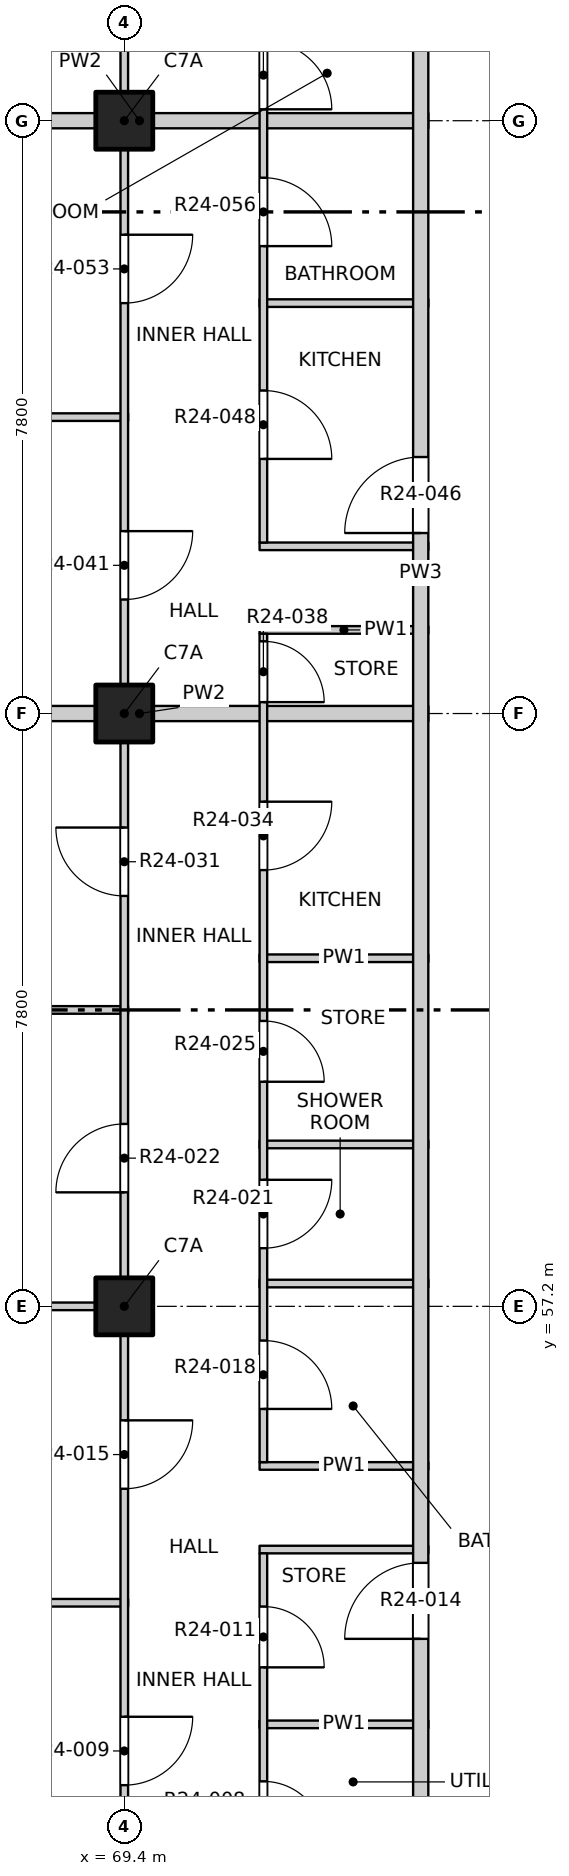
"""IFC4 building model, lengths in metres.
Left out: names, types, materials, properties, quantities, classifications, styles, units other than length and angle.
Written with IfcOpenShell. Run it as: python <this file> out.ifc"""

import sys

from ifc_helpers import new_model, si_unit, direction, frame, frame_2d, origin, origin_2d, place, context, subcontext, project, spatial, rectangle, extrude, element, fill, save


model = new_model("IFC4")
c1 = context("Model", 3, precision=1e-05, world=origin(), true_north=direction((0.0, 1.0)))
c2 = subcontext(c1, "Body", "Model", "MODEL_VIEW")
j1 = project(units=[si_unit("LENGTHUNIT", "METRE"), si_unit("PLANEANGLEUNIT", "RADIAN")], contexts=[c1])
p1 = place(None, origin())
s1 = spatial("IfcSite", under=j1, at=p1, CompositionType="ELEMENT")
p2 = place(p1, origin())
s2 = spatial("IfcBuilding", under=s1, at=p2, CompositionType="ELEMENT")
p3 = place(p2, frame((0.0, 0.0, 246.0)))
s3 = spatial("IfcBuildingStorey", under=s2, at=p3, CompositionType="ELEMENT", Elevation=246.0)
for number, where, z_axis, x_axis in (
    (1, (69.4, 57.2, -0.3), (0.0, 0.0, 1.0), (1.0, 0.0, 0.0)),
    (2, (69.4, 65.0, -0.3), (0.0, 0.0, 1.0), (1.0, 0.0, 0.0)),
    (3, (69.4, 72.8, -0.3), (0.0, 0.0, 1.0), (1.0, 0.0, 0.0)),
):
    element("IfcColumn", number, at=place(p3, frame(where, z_axis=z_axis, x_axis=x_axis)), inside=s3, PredefinedType="COLUMN", context=c2, shape_type="SweptSolid", body=[
        extrude(rectangle(XDim=0.75, YDim=0.75, at=origin_2d()), origin(), (0.0, 0.0, 1.0), 3.45),
    ])
p4 = place(p3, frame((71.18, 51.7, 0.0), z_axis=(0.0, 0.0, 1.0), x_axis=(1.0, 0.0, 0.0)))
e4 = element("IfcWall", 4, at=p4, inside=s3, PredefinedType="PARTITIONING", context=c2, shape_type="SweptSolid", body=[
    extrude(rectangle(XDim=2.22, YDim=0.1, at=frame_2d((1.11, 0.0))), origin(), (0.0, 0.0, 1.0), 3.15),
])
p5 = place(p3, frame((65.8, 53.3, 0.0), z_axis=(0.0, 0.0, 1.0), x_axis=(1.0, 0.0, 0.0)))
e5 = element("IfcWall", 5, at=p5, inside=s3, PredefinedType="PARTITIONING", context=c2, shape_type="SweptSolid", body=[
    extrude(rectangle(XDim=3.65, YDim=0.1, at=frame_2d((1.825, 0.0))), origin(), (0.0, 0.0, 1.0), 3.15),
])
for number, where, z_axis, x_axis in (
    (6, (71.18, 54.0, 0.0), (0.0, 0.0, 1.0), (1.0, 0.0, 0.0)),
    (7, (71.18, 55.1, 0.0), (0.0, 0.0, 1.0), (1.0, 0.0, 0.0)),
):
    element("IfcWall", number, at=place(p3, frame(where, z_axis=z_axis, x_axis=x_axis)), inside=s3, PredefinedType="PARTITIONING", context=c2, shape_type="SweptSolid", body=[
        extrude(rectangle(XDim=2.22, YDim=0.1, at=frame_2d((1.11, 0.0))), origin(), (0.0, 0.0, 1.0), 3.15),
    ])
p6 = place(p3, frame((65.8, 57.2, 0.0), z_axis=(0.0, 0.0, 1.0), x_axis=(1.0, 0.0, 0.0)))
e8 = element("IfcWall", 8, at=p6, inside=s3, PredefinedType="PARTITIONING", context=c2, shape_type="SweptSolid", body=[
    extrude(rectangle(XDim=3.65, YDim=0.1, at=frame_2d((1.825, 0.0))), origin(), (0.0, 0.0, 1.0), 3.15),
])
for number, where, z_axis, x_axis in (
    (9, (71.18, 57.5, 0.0), (0.0, 0.0, 1.0), (1.0, 0.0, 0.0)),
    (10, (71.18, 59.33, 0.0), (0.0, 0.0, 1.0), (1.0, 0.0, 0.0)),
):
    element("IfcWall", number, at=place(p3, frame(where, z_axis=z_axis, x_axis=x_axis)), inside=s3, PredefinedType="PARTITIONING", context=c2, shape_type="SweptSolid", body=[
        extrude(rectangle(XDim=2.22, YDim=0.1, at=frame_2d((1.11, 0.0))), origin(), (0.0, 0.0, 1.0), 3.15),
    ])
p7 = place(p3, frame((65.8, 61.1, 0.0), z_axis=(0.0, 0.0, 1.0), x_axis=(1.0, 0.0, 0.0)))
e11 = element("IfcWall", 11, at=p7, inside=s3, PredefinedType="PARTITIONING", context=c2, shape_type="SweptSolid", body=[
    extrude(rectangle(XDim=3.65, YDim=0.1, at=frame_2d((1.825, 0.0))), origin(), (0.0, 0.0, 1.0), 2.55),
])
p8 = place(p3, frame((71.18, 61.78, 0.0), z_axis=(0.0, 0.0, 1.0), x_axis=(1.0, 0.0, 0.0)))
e12 = element("IfcWall", 12, at=p8, inside=s3, PredefinedType="PARTITIONING", context=c2, shape_type="SweptSolid", body=[
    extrude(rectangle(XDim=2.22, YDim=0.1, at=frame_2d((1.11, 0.0))), origin(), (0.0, 0.0, 1.0), 3.15),
])
p9 = place(p3, frame((65.8, 65.0, 0.0), z_axis=(0.0, 0.0, 1.0), x_axis=(1.0, 0.0, 0.0)))
e13 = element("IfcWall", 13, at=p9, inside=s3, PredefinedType="PARTITIONING", context=c2, shape_type="SweptSolid", body=[
    extrude(rectangle(XDim=7.6, YDim=0.2, at=frame_2d((3.8, 0.0))), origin(), (0.0, 0.0, 1.0), 3.15),
])
for number, where, z_axis, x_axis in (
    (14, (71.18, 66.1, 0.0), (0.0, 0.0, 1.0), (1.0, 0.0, 0.0)),
    (15, (71.18, 67.2, 0.0), (0.0, 0.0, 1.0), (1.0, 0.0, 0.0)),
):
    element("IfcWall", number, at=place(p3, frame(where, z_axis=z_axis, x_axis=x_axis)), inside=s3, PredefinedType="PARTITIONING", context=c2, shape_type="SweptSolid", body=[
        extrude(rectangle(XDim=2.22, YDim=0.1, at=frame_2d((1.11, 0.0))), origin(), (0.0, 0.0, 1.0), 3.15),
    ])
p10 = place(p3, frame((65.8, 68.9, 0.0), z_axis=(0.0, 0.0, 1.0), x_axis=(1.0, 0.0, 0.0)))
e16 = element("IfcWall", 16, at=p10, inside=s3, PredefinedType="PARTITIONING", context=c2, shape_type="SweptSolid", body=[
    extrude(rectangle(XDim=3.65, YDim=0.1, at=frame_2d((1.825, 0.0))), origin(), (0.0, 0.0, 1.0), 2.55),
])
p11 = place(p3, frame((71.18, 70.4, 0.0), z_axis=(0.0, 0.0, 1.0), x_axis=(1.0, 0.0, 0.0)))
e17 = element("IfcWall", 17, at=p11, inside=s3, PredefinedType="PARTITIONING", context=c2, shape_type="SweptSolid", body=[
    extrude(rectangle(XDim=2.22, YDim=0.1, at=frame_2d((1.11, 0.0))), origin(), (0.0, 0.0, 1.0), 3.15),
])
p12 = place(p3, frame((65.8, 72.8, 0.0), z_axis=(0.0, 0.0, 1.0), x_axis=(1.0, 0.0, 0.0)))
e18 = element("IfcWall", 18, at=p12, inside=s3, PredefinedType="PARTITIONING", context=c2, shape_type="SweptSolid", body=[
    extrude(rectangle(XDim=7.6, YDim=0.2, at=frame_2d((3.8, 0.0))), origin(), (0.0, 0.0, 1.0), 3.15),
])
p13 = place(p3, frame((69.4, 45.8, 0.0), z_axis=(0.0, 0.0, 1.0), x_axis=(0.0, 1.0, 0.0)))
e19 = element("IfcWall", 19, at=p13, inside=s3, PredefinedType="PARTITIONING", context=c2, shape_type="SweptSolid", body=[
    extrude(rectangle(XDim=38.4, YDim=0.1, at=frame_2d((19.2, 0.0))), origin(), (0.0, 0.0, 1.0), 3.15),
])
p14 = place(p13, frame((1.05, 0.0, 0.0)))
e20 = element("IfcOpeningElement", 20, at=p14, cuts=e19, PredefinedType="OPENING", context=c2, shape_type="SweptSolid", body=[
    extrude(rectangle(XDim=1.2, YDim=2.1, at=frame_2d((0.6, 1.05))), frame((0.0, 0.06, 0.0), z_axis=(0.0, -1.0, 0.0), x_axis=(1.0, 0.0, 0.0)), (0.0, 0.0, 1.0), 0.12),
])
p15 = place(p13, frame((5.1, 0.0, 0.0)))
e21 = element("IfcOpeningElement", 21, at=p15, cuts=e19, PredefinedType="OPENING", context=c2, shape_type="SweptSolid", body=[
    extrude(rectangle(XDim=0.9, YDim=2.1, at=frame_2d((0.45, 1.05))), frame((0.0, 0.06, 0.0), z_axis=(0.0, -1.0, 0.0), x_axis=(1.0, 0.0, 0.0)), (0.0, 0.0, 1.0), 0.12),
])
p16 = place(p13, frame((9.0, 0.0, 0.0)))
e22 = element("IfcOpeningElement", 22, at=p16, cuts=e19, PredefinedType="OPENING", context=c2, shape_type="SweptSolid", body=[
    extrude(rectangle(XDim=0.9, YDim=2.1, at=frame_2d((0.45, 1.05))), frame((0.0, 0.06, 0.0), z_axis=(0.0, -1.0, 0.0), x_axis=(1.0, 0.0, 0.0)), (0.0, 0.0, 1.0), 0.12),
])
p17 = place(p13, frame((12.9, 0.0, 0.0)))
e23 = element("IfcOpeningElement", 23, at=p17, cuts=e19, PredefinedType="OPENING", context=c2, shape_type="SweptSolid", body=[
    extrude(rectangle(XDim=0.9, YDim=2.1, at=frame_2d((0.45, 1.05))), frame((0.0, 0.06, 0.0), z_axis=(0.0, -1.0, 0.0), x_axis=(1.0, 0.0, 0.0)), (0.0, 0.0, 1.0), 0.12),
])
p18 = place(p13, frame((16.8, 0.0, 0.0)))
e24 = element("IfcOpeningElement", 24, at=p18, cuts=e19, PredefinedType="OPENING", context=c2, shape_type="SweptSolid", body=[
    extrude(rectangle(XDim=0.9, YDim=2.1, at=frame_2d((0.45, 1.05))), frame((0.0, 0.06, 0.0), z_axis=(0.0, -1.0, 0.0), x_axis=(1.0, 0.0, 0.0)), (0.0, 0.0, 1.0), 0.12),
])
p19 = place(p13, frame((20.7, 0.0, 0.0)))
e25 = element("IfcOpeningElement", 25, at=p19, cuts=e19, PredefinedType="OPENING", context=c2, shape_type="SweptSolid", body=[
    extrude(rectangle(XDim=0.9, YDim=2.1, at=frame_2d((0.45, 1.05))), frame((0.0, 0.06, 0.0), z_axis=(0.0, -1.0, 0.0), x_axis=(1.0, 0.0, 0.0)), (0.0, 0.0, 1.0), 0.12),
])
p20 = place(p13, frame((24.6, 0.0, 0.0)))
e26 = element("IfcOpeningElement", 26, at=p20, cuts=e19, PredefinedType="OPENING", context=c2, shape_type="SweptSolid", body=[
    extrude(rectangle(XDim=0.9, YDim=2.1, at=frame_2d((0.45, 1.05))), frame((0.0, 0.06, 0.0), z_axis=(0.0, -1.0, 0.0), x_axis=(1.0, 0.0, 0.0)), (0.0, 0.0, 1.0), 0.12),
])
p21 = place(p13, frame((30.3, 0.0, 0.0)))
e27 = element("IfcOpeningElement", 27, at=p21, cuts=e19, PredefinedType="OPENING", context=c2, shape_type="SweptSolid", body=[
    extrude(rectangle(XDim=1.2, YDim=2.1, at=frame_2d((0.6, 1.05))), frame((0.0, 0.06, 0.0), z_axis=(0.0, -1.0, 0.0), x_axis=(1.0, 0.0, 0.0)), (0.0, 0.0, 1.0), 0.12),
])
p22 = place(p13, frame((36.15, 0.0, 0.0)))
e28 = element("IfcOpeningElement", 28, at=p22, cuts=e19, PredefinedType="OPENING", context=c2, shape_type="SweptSolid", body=[
    extrude(rectangle(XDim=1.2, YDim=2.1, at=frame_2d((0.6, 1.05))), frame((0.0, 0.06, 0.0), z_axis=(0.0, -1.0, 0.0), x_axis=(1.0, 0.0, 0.0)), (0.0, 0.0, 1.0), 0.12),
])
p23 = place(p3, frame((71.23, 49.45, 0.0), z_axis=(0.0, 0.0, 1.0), x_axis=(0.0, 1.0, 0.0)))
e29 = element("IfcWall", 29, at=p23, inside=s3, PredefinedType="PARTITIONING", context=c2, shape_type="SweptSolid", body=[
    extrude(rectangle(XDim=4.5, YDim=0.1, at=frame_2d((2.25, 0.0))), origin(), (0.0, 0.0, 1.0), 3.15),
])
p24 = place(p23, frame((0.7, 0.0, 0.0)))
e30 = element("IfcOpeningElement", 30, at=p24, cuts=e29, PredefinedType="OPENING", context=c2, shape_type="SweptSolid", body=[
    extrude(rectangle(XDim=0.8, YDim=2.1, at=frame_2d((0.4, 1.05))), frame((0.0, 0.06, 0.0), z_axis=(0.0, -1.0, 0.0), x_axis=(1.0, 0.0, 0.0)), (0.0, 0.0, 1.0), 0.12),
])
p25 = place(p23, frame((3.0, 0.0, 0.0)))
e31 = element("IfcOpeningElement", 31, at=p25, cuts=e29, PredefinedType="OPENING", context=c2, shape_type="SweptSolid", body=[
    extrude(rectangle(XDim=0.8, YDim=2.1, at=frame_2d((0.4, 1.05))), frame((0.0, 0.06, 0.0), z_axis=(0.0, -1.0, 0.0), x_axis=(1.0, 0.0, 0.0)), (0.0, 0.0, 1.0), 0.12),
])
p26 = place(p3, frame((71.23, 55.15, 0.0), z_axis=(0.0, 0.0, 1.0), x_axis=(0.0, 1.0, 0.0)))
e32 = element("IfcWall", 32, at=p26, inside=s3, PredefinedType="PARTITIONING", context=c2, shape_type="SweptSolid", body=[
    extrude(rectangle(XDim=10.9, YDim=0.1, at=frame_2d((5.45, 0.0))), origin(), (0.0, 0.0, 1.0), 3.15),
])
p27 = place(p26, frame((0.7, 0.0, 0.0)))
e33 = element("IfcOpeningElement", 33, at=p27, cuts=e32, PredefinedType="OPENING", context=c2, shape_type="SweptSolid", body=[
    extrude(rectangle(XDim=0.9, YDim=2.1, at=frame_2d((0.45, 1.05))), frame((0.0, 0.06, 0.0), z_axis=(0.0, -1.0, 0.0), x_axis=(1.0, 0.0, 0.0)), (0.0, 0.0, 1.0), 0.12),
])
p28 = place(p26, frame((2.815, 0.0, 0.0)))
e34 = element("IfcOpeningElement", 34, at=p28, cuts=e32, PredefinedType="OPENING", context=c2, shape_type="SweptSolid", body=[
    extrude(rectangle(XDim=0.9, YDim=2.1, at=frame_2d((0.45, 1.05))), frame((0.0, 0.06, 0.0), z_axis=(0.0, -1.0, 0.0), x_axis=(1.0, 0.0, 0.0)), (0.0, 0.0, 1.0), 0.12),
])
p29 = place(p26, frame((5.005, 0.0, 0.0)))
e35 = element("IfcOpeningElement", 35, at=p29, cuts=e32, PredefinedType="OPENING", context=c2, shape_type="SweptSolid", body=[
    extrude(rectangle(XDim=0.8, YDim=2.1, at=frame_2d((0.4, 1.05))), frame((0.0, 0.06, 0.0), z_axis=(0.0, -1.0, 0.0), x_axis=(1.0, 0.0, 0.0)), (0.0, 0.0, 1.0), 0.12),
])
p30 = place(p26, frame((7.79, 0.0, 0.0)))
e36 = element("IfcOpeningElement", 36, at=p30, cuts=e32, PredefinedType="OPENING", context=c2, shape_type="SweptSolid", body=[
    extrude(rectangle(XDim=0.9, YDim=2.1, at=frame_2d((0.45, 1.05))), frame((0.0, 0.06, 0.0), z_axis=(0.0, -1.0, 0.0), x_axis=(1.0, 0.0, 0.0)), (0.0, 0.0, 1.0), 0.12),
])
p31 = place(p26, frame((10.0, 0.0, 0.0)))
e37 = element("IfcOpeningElement", 37, at=p31, cuts=e32, PredefinedType="OPENING", context=c2, shape_type="SweptSolid", body=[
    extrude(rectangle(XDim=0.8, YDim=2.1, at=frame_2d((0.4, 1.05))), frame((0.0, 0.06, 0.0), z_axis=(0.0, -1.0, 0.0), x_axis=(1.0, 0.0, 0.0)), (0.0, 0.0, 1.0), 0.12),
])
p32 = place(p3, frame((71.23, 67.25, 0.0), z_axis=(0.0, 0.0, 1.0), x_axis=(0.0, 1.0, 0.0)))
e38 = element("IfcWall", 38, at=p32, inside=s3, PredefinedType="PARTITIONING", context=c2, shape_type="SweptSolid", body=[
    extrude(rectangle(XDim=6.7, YDim=0.1, at=frame_2d((3.35, 0.0))), origin(), (0.0, 0.0, 1.0), 3.15),
])
p33 = place(p32, frame((1.1, 0.0, 0.0)))
e39 = element("IfcOpeningElement", 39, at=p33, cuts=e38, PredefinedType="OPENING", context=c2, shape_type="SweptSolid", body=[
    extrude(rectangle(XDim=0.9, YDim=2.1, at=frame_2d((0.45, 1.05))), frame((0.0, 0.06, 0.0), z_axis=(0.0, -1.0, 0.0), x_axis=(1.0, 0.0, 0.0)), (0.0, 0.0, 1.0), 0.12),
])
p34 = place(p32, frame((3.9, 0.0, 0.0)))
e40 = element("IfcOpeningElement", 40, at=p34, cuts=e38, PredefinedType="OPENING", context=c2, shape_type="SweptSolid", body=[
    extrude(rectangle(XDim=0.9, YDim=2.1, at=frame_2d((0.45, 1.05))), frame((0.0, 0.06, 0.0), z_axis=(0.0, -1.0, 0.0), x_axis=(1.0, 0.0, 0.0)), (0.0, 0.0, 1.0), 0.12),
])
p35 = place(p32, frame((5.7, 0.0, 0.0)))
e41 = element("IfcOpeningElement", 41, at=p35, cuts=e38, PredefinedType="OPENING", context=c2, shape_type="SweptSolid", body=[
    extrude(rectangle(XDim=0.9, YDim=2.1, at=frame_2d((0.45, 1.05))), frame((0.0, 0.06, 0.0), z_axis=(0.0, -1.0, 0.0), x_axis=(1.0, 0.0, 0.0)), (0.0, 0.0, 1.0), 0.12),
])
p36 = place(p3, frame((73.3, 49.5, 0.0), z_axis=(0.0, 0.0, 1.0), x_axis=(0.0, 1.0, 0.0)))
e42 = element("IfcWall", 42, at=p36, inside=s3, PredefinedType="PARTITIONING", context=c2, shape_type="SweptSolid", body=[
    extrude(rectangle(XDim=34.7, YDim=0.2, at=frame_2d((17.35, 0.0))), origin(), (0.0, 0.0, 1.0), 3.15),
])
p37 = place(p36, frame((3.325, 0.0, 0.0)))
e43 = element("IfcOpeningElement", 43, at=p37, cuts=e42, PredefinedType="OPENING", context=c2, shape_type="SweptSolid", body=[
    extrude(rectangle(XDim=1.0, YDim=2.1, at=frame_2d((0.5, 1.05))), frame((0.0, 0.11, 0.0), z_axis=(0.0, -1.0, 0.0), x_axis=(1.0, 0.0, 0.0)), (0.0, 0.0, 1.0), 0.22),
])
p38 = place(p36, frame((17.875, 0.0, 0.0)))
e44 = element("IfcOpeningElement", 44, at=p38, cuts=e42, PredefinedType="OPENING", context=c2, shape_type="SweptSolid", body=[
    extrude(rectangle(XDim=1.0, YDim=2.1, at=frame_2d((0.5, 1.05))), frame((0.0, 0.11, 0.0), z_axis=(0.0, -1.0, 0.0), x_axis=(1.0, 0.0, 0.0)), (0.0, 0.0, 1.0), 0.22),
])
p39 = place(p36, frame((25.775, 0.0, 0.0)))
e45 = element("IfcOpeningElement", 45, at=p39, cuts=e42, PredefinedType="OPENING", context=c2, shape_type="SweptSolid", body=[
    extrude(rectangle(XDim=1.0, YDim=2.1, at=frame_2d((0.5, 1.05))), frame((0.0, 0.11, 0.0), z_axis=(0.0, -1.0, 0.0), x_axis=(1.0, 0.0, 0.0)), (0.0, 0.0, 1.0), 0.22),
])
p40 = place(p24, origin())
e46 = element("IfcDoor", 46, at=p40, inside=s3, OperationType="SINGLE_SWING_RIGHT", PredefinedType="DOOR", context=c2, shape_type="SweptSolid", body=[
    extrude(rectangle(XDim=0.8, YDim=2.1, at=frame_2d((0.4, 1.05))), frame((0.0, 0.025, 0.0), z_axis=(0.0, -1.0, 0.0), x_axis=(1.0, 0.0, 0.0)), (0.0, 0.0, 1.0), 0.05),
])
fill(e30, e46)
p41 = place(p15, origin())
e47 = element("IfcDoor", 47, at=p41, inside=s3, OperationType="SINGLE_SWING_LEFT", PredefinedType="DOOR", context=c2, shape_type="SweptSolid", body=[
    extrude(rectangle(XDim=0.9, YDim=2.1, at=frame_2d((0.45, 1.05))), frame((0.0, 0.025, 0.0), z_axis=(0.0, -1.0, 0.0), x_axis=(1.0, 0.0, 0.0)), (0.0, 0.0, 1.0), 0.05),
])
fill(e21, e47)
p42 = place(p25, origin())
e48 = element("IfcDoor", 48, at=p42, inside=s3, OperationType="SINGLE_SWING_RIGHT", PredefinedType="DOOR", context=c2, shape_type="SweptSolid", body=[
    extrude(rectangle(XDim=0.8, YDim=2.1, at=frame_2d((0.4, 1.05))), frame((0.0, 0.025, 0.0), z_axis=(0.0, -1.0, 0.0), x_axis=(1.0, 0.0, 0.0)), (0.0, 0.0, 1.0), 0.05),
])
fill(e31, e48)
p43 = place(p37, origin())
e49 = element("IfcDoor", 49, at=p43, inside=s3, OperationType="SINGLE_SWING_LEFT", PredefinedType="DOOR", context=c2, shape_type="SweptSolid", body=[
    extrude(rectangle(XDim=1.0, YDim=2.1, at=frame_2d((0.5, 1.05))), frame((0.0, 0.025, 0.0), z_axis=(0.0, -1.0, 0.0), x_axis=(1.0, 0.0, 0.0)), (0.0, 0.0, 1.0), 0.05),
])
fill(e43, e49)
p44 = place(p16, origin())
e50 = element("IfcDoor", 50, at=p44, inside=s3, OperationType="SINGLE_SWING_LEFT", PredefinedType="DOOR", context=c2, shape_type="SweptSolid", body=[
    extrude(rectangle(XDim=0.9, YDim=2.1, at=frame_2d((0.45, 1.05))), frame((0.0, 0.025, 0.0), z_axis=(0.0, -1.0, 0.0), x_axis=(1.0, 0.0, 0.0)), (0.0, 0.0, 1.0), 0.05),
])
fill(e22, e50)
p45 = place(p27, origin())
e51 = element("IfcDoor", 51, at=p45, inside=s3, OperationType="SINGLE_SWING_RIGHT", PredefinedType="DOOR", context=c2, shape_type="SweptSolid", body=[
    extrude(rectangle(XDim=0.9, YDim=2.1, at=frame_2d((0.45, 1.05))), frame((0.0, 0.025, 0.0), z_axis=(0.0, -1.0, 0.0), x_axis=(1.0, 0.0, 0.0)), (0.0, 0.0, 1.0), 0.05),
])
fill(e33, e51)
p46 = place(p28, origin())
e52 = element("IfcDoor", 52, at=p46, inside=s3, OperationType="SINGLE_SWING_LEFT", PredefinedType="DOOR", context=c2, shape_type="SweptSolid", body=[
    extrude(rectangle(XDim=0.9, YDim=2.1, at=frame_2d((0.45, 1.05))), frame((0.0, 0.025, 0.0), z_axis=(0.0, -1.0, 0.0), x_axis=(1.0, 0.0, 0.0)), (0.0, 0.0, 1.0), 0.05),
])
fill(e34, e52)
p47 = place(p17, origin())
e53 = element("IfcDoor", 53, at=p47, inside=s3, OperationType="SINGLE_SWING_LEFT", PredefinedType="DOOR", context=c2, shape_type="SweptSolid", body=[
    extrude(rectangle(XDim=0.9, YDim=2.1, at=frame_2d((0.45, 1.05))), frame((0.0, 0.025, 0.0), z_axis=(0.0, -1.0, 0.0), x_axis=(1.0, 0.0, 0.0)), (0.0, 0.0, 1.0), 0.05),
])
fill(e23, e53)
p48 = place(p29, origin())
e54 = element("IfcDoor", 54, at=p48, inside=s3, OperationType="SINGLE_SWING_RIGHT", PredefinedType="DOOR", context=c2, shape_type="SweptSolid", body=[
    extrude(rectangle(XDim=0.8, YDim=2.1, at=frame_2d((0.4, 1.05))), frame((0.0, 0.025, 0.0), z_axis=(0.0, -1.0, 0.0), x_axis=(1.0, 0.0, 0.0)), (0.0, 0.0, 1.0), 0.05),
])
fill(e35, e54)
p49 = place(p18, origin())
e55 = element("IfcDoor", 55, at=p49, inside=s3, OperationType="SINGLE_SWING_RIGHT", PredefinedType="DOOR", context=c2, shape_type="SweptSolid", body=[
    extrude(rectangle(XDim=0.9, YDim=2.1, at=frame_2d((0.45, 1.05))), frame((0.0, 0.025, 0.0), z_axis=(0.0, -1.0, 0.0), x_axis=(1.0, 0.0, 0.0)), (0.0, 0.0, 1.0), 0.05),
])
fill(e24, e55)
p50 = place(p30, origin())
e56 = element("IfcDoor", 56, at=p50, inside=s3, OperationType="SINGLE_SWING_LEFT", PredefinedType="DOOR", context=c2, shape_type="SweptSolid", body=[
    extrude(rectangle(XDim=0.9, YDim=2.1, at=frame_2d((0.45, 1.05))), frame((0.0, 0.025, 0.0), z_axis=(0.0, -1.0, 0.0), x_axis=(1.0, 0.0, 0.0)), (0.0, 0.0, 1.0), 0.05),
])
fill(e36, e56)
p51 = place(p31, origin())
e57 = element("IfcDoor", 57, at=p51, inside=s3, OperationType="SINGLE_SWING_RIGHT", PredefinedType="DOOR", context=c2, shape_type="SweptSolid", body=[
    extrude(rectangle(XDim=0.8, YDim=2.1, at=frame_2d((0.4, 1.05))), frame((0.0, 0.025, 0.0), z_axis=(0.0, -1.0, 0.0), x_axis=(1.0, 0.0, 0.0)), (0.0, 0.0, 1.0), 0.05),
])
fill(e37, e57)
p52 = place(p19, origin())
e58 = element("IfcDoor", 58, at=p52, inside=s3, OperationType="SINGLE_SWING_LEFT", PredefinedType="DOOR", context=c2, shape_type="SweptSolid", body=[
    extrude(rectangle(XDim=0.9, YDim=2.1, at=frame_2d((0.45, 1.05))), frame((0.0, 0.025, 0.0), z_axis=(0.0, -1.0, 0.0), x_axis=(1.0, 0.0, 0.0)), (0.0, 0.0, 1.0), 0.05),
])
fill(e25, e58)
p53 = place(p38, origin())
e59 = element("IfcDoor", 59, at=p53, inside=s3, OperationType="SINGLE_SWING_RIGHT", PredefinedType="DOOR", context=c2, shape_type="SweptSolid", body=[
    extrude(rectangle(XDim=1.0, YDim=2.1, at=frame_2d((0.5, 1.05))), frame((0.0, 0.025, 0.0), z_axis=(0.0, -1.0, 0.0), x_axis=(1.0, 0.0, 0.0)), (0.0, 0.0, 1.0), 0.05),
])
fill(e44, e59)
p54 = place(p33, origin())
e60 = element("IfcDoor", 60, at=p54, inside=s3, OperationType="SINGLE_SWING_RIGHT", PredefinedType="DOOR", context=c2, shape_type="SweptSolid", body=[
    extrude(rectangle(XDim=0.9, YDim=2.1, at=frame_2d((0.45, 1.05))), frame((0.0, 0.025, 0.0), z_axis=(0.0, -1.0, 0.0), x_axis=(1.0, 0.0, 0.0)), (0.0, 0.0, 1.0), 0.05),
])
fill(e39, e60)
p55 = place(p20, origin())
e61 = element("IfcDoor", 61, at=p55, inside=s3, OperationType="SINGLE_SWING_LEFT", PredefinedType="DOOR", context=c2, shape_type="SweptSolid", body=[
    extrude(rectangle(XDim=0.9, YDim=2.1, at=frame_2d((0.45, 1.05))), frame((0.0, 0.025, 0.0), z_axis=(0.0, -1.0, 0.0), x_axis=(1.0, 0.0, 0.0)), (0.0, 0.0, 1.0), 0.05),
])
fill(e26, e61)
p56 = place(p34, origin())
e62 = element("IfcDoor", 62, at=p56, inside=s3, OperationType="SINGLE_SWING_RIGHT", PredefinedType="DOOR", context=c2, shape_type="SweptSolid", body=[
    extrude(rectangle(XDim=0.9, YDim=2.1, at=frame_2d((0.45, 1.05))), frame((0.0, 0.025, 0.0), z_axis=(0.0, -1.0, 0.0), x_axis=(1.0, 0.0, 0.0)), (0.0, 0.0, 1.0), 0.05),
])
fill(e40, e62)
p57 = place(p35, origin())
e63 = element("IfcDoor", 63, at=p57, inside=s3, OperationType="SINGLE_SWING_RIGHT", PredefinedType="DOOR", context=c2, shape_type="SweptSolid", body=[
    extrude(rectangle(XDim=0.9, YDim=2.1, at=frame_2d((0.45, 1.05))), frame((0.0, 0.025, 0.0), z_axis=(0.0, -1.0, 0.0), x_axis=(1.0, 0.0, 0.0)), (0.0, 0.0, 1.0), 0.05),
])
fill(e41, e63)
save(model, sys.argv[1])
